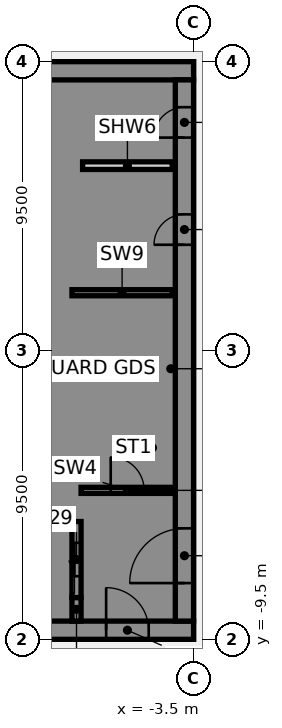
"""IFC4 building model, lengths in metres.
Left out: names, types, materials, properties, quantities, classifications, styles, units other than length and angle.
Written with IfcOpenShell. Run it as: python <this file> out.ifc"""

import sys

from ifc_helpers import new_model, si_unit, direction, frame, frame_2d, origin, place, context, subcontext, project, spatial, polyline, rectangle, outline, extrude, element, fill, save


model = new_model("IFC4")
c1 = context("Model", 3, precision=1e-05, world=origin(), true_north=direction((0.0, 1.0)))
c2 = subcontext(c1, "Body", "Model", "MODEL_VIEW")
j1 = project(units=[si_unit("LENGTHUNIT", "METRE"), si_unit("PLANEANGLEUNIT", "RADIAN")], contexts=[c1])
p1 = place(None, origin())
s1 = spatial("IfcSite", under=j1, at=p1, CompositionType="ELEMENT")
p2 = place(p1, origin())
s2 = spatial("IfcBuilding", under=s1, at=p2, CompositionType="ELEMENT")
p3 = place(p2, frame((0.0, 0.0, 121.0)))
s3 = spatial("IfcBuildingStorey", under=s2, at=p3, CompositionType="ELEMENT", Elevation=121.0)
p4 = place(p3, frame((-16.5, -9.2, 0.0), z_axis=(0.0, 0.0, 1.0), x_axis=(1.0, 0.0, 0.0)))
e1 = element("IfcWall", 1, at=p4, inside=s3, PredefinedType="SHEAR", context=c2, shape_type="SweptSolid", body=[
    extrude(rectangle(XDim=13.0, YDim=0.6, at=frame_2d((6.5, 0.0))), origin(), (0.0, 0.0, 1.0), 3.61),
])
p5 = place(p4, frame((4.15, 0.0, 0.0)))
e2 = element("IfcOpeningElement", 2, at=p5, cuts=e1, PredefinedType="OPENING", context=c2, shape_type="SweptSolid", body=[
    extrude(rectangle(XDim=1.4, YDim=2.1, at=frame_2d((0.7, 1.05))), frame((0.0, 0.31, 0.0), z_axis=(0.0, -1.0, 0.0), x_axis=(1.0, 0.0, 0.0)), (0.0, 0.0, 1.0), 0.62),
])
p6 = place(p4, frame((10.125, 0.0, 0.0)))
e3 = element("IfcOpeningElement", 3, at=p6, cuts=e1, PredefinedType="OPENING", context=c2, shape_type="SweptSolid", body=[
    extrude(rectangle(XDim=1.4, YDim=2.1, at=frame_2d((0.7, 1.05))), frame((0.0, 0.31, 0.0), z_axis=(0.0, -1.0, 0.0), x_axis=(1.0, 0.0, 0.0)), (0.0, 0.0, 1.0), 0.62),
])
p7 = place(p3, frame((-16.5, 9.2, 0.0), z_axis=(0.0, 0.0, 1.0), x_axis=(1.0, 0.0, 0.0)))
e4 = element("IfcWall", 4, at=p7, inside=s3, PredefinedType="SHEAR", context=c2, shape_type="SweptSolid", body=[
    extrude(rectangle(XDim=13.0, YDim=0.6, at=frame_2d((6.5, 0.0))), origin(), (0.0, 0.0, 1.0), 3.61),
])
p8 = place(p3, origin())
e5 = element("IfcWall", 5, at=p8, inside=s3, PredefinedType="SHEAR", context=c2, shape_type="SweptSolid", body=[
    extrude(outline(polyline([(-9.8, -5.375), (-9.8, -5.625), (-7.5, -5.625), (-7.2, -5.625), (-7.2, 8.9), (-7.5, 8.9), (-9.8, 8.9), (-9.8, 8.125), (-7.5, 8.125), (-7.5, 5.625), (-9.8, 5.625), (-9.8, 5.375), (-7.5, 5.375), (-7.5, 2.875), (-9.8, 2.875), (-9.8, 2.625), (-7.5, 2.625), (-7.5, 0.125), (-9.8, 0.125), (-9.8, -0.125), (-7.5, -0.125), (-7.5, -2.625), (-9.8, -2.625), (-9.8, -2.875), (-7.5, -2.875), (-7.5, -5.375), (-9.8, -5.375)])), origin(), (0.0, 0.0, 1.0), 3.61),
])
p9 = place(p3, origin())
e6 = element("IfcWall", 6, at=p9, inside=s3, PredefinedType="SHEAR", context=c2, shape_type="SweptSolid", body=[
    extrude(outline(polyline([(-7.5, -8.125), (-9.55, -8.125), (-9.55, -5.625), (-9.8, -5.625), (-9.8, -8.125), (-9.8, -8.9), (-7.5, -8.9), (-7.5, -8.125)])), origin(), (0.0, 0.0, 1.0), 3.61),
])
p10 = place(p3, frame((-7.35, -8.9, 0.0), z_axis=(0.0, 0.0, 1.0), x_axis=(0.0, 1.0, 0.0)))
e7 = element("IfcWall", 7, at=p10, inside=s3, PredefinedType="SHEAR", context=c2, shape_type="SweptSolid", body=[
    extrude(rectangle(XDim=0.775, YDim=0.3, at=frame_2d((0.387, 0.0))), origin(), (0.0, 0.0, 1.0), 3.61),
])
p11 = place(p3, frame((-7.5, 1.9, 0.0), z_axis=(0.0, 0.0, 1.0), x_axis=(1.0, 0.0, 0.0)))
e8 = element("IfcWall", 8, at=p11, inside=s3, PredefinedType="SHEAR", context=c2, shape_type="SweptSolid", body=[
    extrude(rectangle(XDim=3.3, YDim=0.2, at=frame_2d((1.65, 0.0))), origin(), (0.0, 0.0, 1.0), 3.61),
])
p12 = place(p3, frame((-7.35, -8.125, 0.0), z_axis=(0.0, 0.0, 1.0), x_axis=(0.0, 1.0, 0.0)))
e9 = element("IfcWall", 9, at=p12, inside=s3, PredefinedType="SHEAR", context=c2, shape_type="SweptSolid", body=[
    extrude(rectangle(XDim=2.5, YDim=0.3, at=frame_2d((1.25, 0.0))), origin(), (0.0, 0.0, 1.0), 3.61),
])
p13 = place(p12, frame((0.7, 0.0, 0.0)))
e10 = element("IfcOpeningElement", 10, at=p13, cuts=e9, PredefinedType="OPENING", context=c2, shape_type="SweptSolid", body=[
    extrude(rectangle(XDim=1.1, YDim=2.1, at=frame_2d((0.55, 1.05))), frame((0.0, 0.16, 0.0), z_axis=(0.0, -1.0, 0.0), x_axis=(1.0, 0.0, 0.0)), (0.0, 0.0, 1.0), 0.32),
])
p14 = place(p3, frame((-3.8, -8.9, 0.0), z_axis=(0.0, 0.0, 1.0), x_axis=(0.0, 1.0, 0.0)))
e11 = element("IfcWall", 11, at=p14, inside=s3, PredefinedType="SHEAR", context=c2, shape_type="SweptSolid", body=[
    extrude(rectangle(XDim=17.8, YDim=0.6, at=frame_2d((8.9, 0.0))), origin(), (0.0, 0.0, 1.0), 3.61),
])
p15 = place(p14, frame((1.25, 0.0, 0.0)))
e12 = element("IfcOpeningElement", 12, at=p15, cuts=e11, PredefinedType="OPENING", context=c2, shape_type="SweptSolid", body=[
    extrude(rectangle(XDim=1.8, YDim=2.1, at=frame_2d((0.9, 1.05))), frame((0.0, 0.31, 0.0), z_axis=(0.0, -1.0, 0.0), x_axis=(1.0, 0.0, 0.0)), (0.0, 0.0, 1.0), 0.62),
])
p16 = place(p14, frame((12.377, 0.0, 0.0)))
e13 = element("IfcOpeningElement", 13, at=p16, cuts=e11, PredefinedType="OPENING", context=c2, shape_type="SweptSolid", body=[
    extrude(rectangle(XDim=1.0, YDim=2.1, at=frame_2d((0.5, 1.05))), frame((0.0, 0.31, 0.0), z_axis=(0.0, -1.0, 0.0), x_axis=(1.0, 0.0, 0.0)), (0.0, 0.0, 1.0), 0.62),
])
p17 = place(p14, frame((15.903, 0.0, 0.0)))
e14 = element("IfcOpeningElement", 14, at=p17, cuts=e11, PredefinedType="OPENING", context=c2, shape_type="SweptSolid", body=[
    extrude(rectangle(XDim=1.0, YDim=2.1, at=frame_2d((0.5, 1.05))), frame((0.0, 0.31, 0.0), z_axis=(0.0, -1.0, 0.0), x_axis=(1.0, 0.0, 0.0)), (0.0, 0.0, 1.0), 0.62),
])
p18 = place(p3, frame((-7.15, 6.08, 0.0), z_axis=(0.0, 0.0, 1.0), x_axis=(1.0, 0.0, 0.0)))
e15 = element("IfcWall", 15, at=p18, inside=s3, PredefinedType="PARTITIONING", context=c2, shape_type="SweptSolid", body=[
    extrude(rectangle(XDim=2.95, YDim=0.25, at=frame_2d((1.475, 0.0))), origin(), (0.0, 0.0, 1.0), 3.61),
])
p19 = place(p3, frame((-7.2, -4.6, 0.0), z_axis=(0.0, 0.0, 1.0), x_axis=(1.0, 0.0, 0.0)))
e16 = element("IfcWall", 16, at=p19, inside=s3, PredefinedType="SHEAR", context=c2, shape_type="SweptSolid", body=[
    extrude(rectangle(XDim=3.1, YDim=0.2, at=frame_2d((1.55, 0.0))), origin(), (0.0, 0.0, 1.0), 3.61),
])
p20 = place(p19, frame((0.975, 0.0, 0.0)))
e17 = element("IfcOpeningElement", 17, at=p20, cuts=e16, PredefinedType="OPENING", context=c2, shape_type="SweptSolid", body=[
    extrude(rectangle(XDim=1.1, YDim=2.1, at=frame_2d((0.55, 1.05))), frame((0.0, 0.11, 0.0), z_axis=(0.0, -1.0, 0.0), x_axis=(1.0, 0.0, 0.0)), (0.0, 0.0, 1.0), 0.22),
])
p21 = place(p6, origin())
e18 = element("IfcDoor", 18, at=p21, inside=s3, OperationType="SINGLE_SWING_LEFT", PredefinedType="DOOR", context=c2, shape_type="SweptSolid", body=[
    extrude(rectangle(XDim=1.4, YDim=2.1, at=frame_2d((0.7, 1.05))), frame((0.0, 0.025, 0.0), z_axis=(0.0, -1.0, 0.0), x_axis=(1.0, 0.0, 0.0)), (0.0, 0.0, 1.0), 0.05),
])
fill(e3, e18)
p22 = place(p15, origin())
e19 = element("IfcDoor", 19, at=p22, inside=s3, OperationType="SINGLE_SWING_LEFT", PredefinedType="DOOR", context=c2, shape_type="SweptSolid", body=[
    extrude(rectangle(XDim=1.8, YDim=2.1, at=frame_2d((0.9, 1.05))), frame((0.0, 0.025, 0.0), z_axis=(0.0, -1.0, 0.0), x_axis=(1.0, 0.0, 0.0)), (0.0, 0.0, 1.0), 0.05),
])
fill(e12, e19)
p23 = place(p16, origin())
e20 = element("IfcDoor", 20, at=p23, inside=s3, OperationType="SINGLE_SWING_LEFT", PredefinedType="DOOR", context=c2, shape_type="SweptSolid", body=[
    extrude(rectangle(XDim=1.0, YDim=2.1, at=frame_2d((0.5, 1.05))), frame((0.0, 0.275, 0.0), z_axis=(0.0, -1.0, 0.0), x_axis=(1.0, 0.0, 0.0)), (0.0, 0.0, 1.0), 0.05),
])
fill(e13, e20)
p24 = place(p17, origin())
e21 = element("IfcDoor", 21, at=p24, inside=s3, OperationType="SINGLE_SWING_LEFT", PredefinedType="DOOR", context=c2, shape_type="SweptSolid", body=[
    extrude(rectangle(XDim=1.0, YDim=2.1, at=frame_2d((0.5, 1.05))), frame((0.0, 0.275, 0.0), z_axis=(0.0, -1.0, 0.0), x_axis=(1.0, 0.0, 0.0)), (0.0, 0.0, 1.0), 0.05),
])
fill(e14, e21)
p25 = place(p20, origin())
e22 = element("IfcDoor", 22, at=p25, inside=s3, OperationType="SINGLE_SWING_LEFT", PredefinedType="DOOR", context=c2, shape_type="SweptSolid", body=[
    extrude(rectangle(XDim=1.1, YDim=2.1, at=frame_2d((0.55, 1.05))), frame((0.0, 0.025, 0.0), z_axis=(0.0, -1.0, 0.0), x_axis=(1.0, 0.0, 0.0)), (0.0, 0.0, 1.0), 0.05),
])
fill(e17, e22)
p26 = place(p13, origin())
e23 = element("IfcDoor", 23, at=p26, inside=s3, OperationType="SLIDING_TO_LEFT", PredefinedType="DOOR", context=c2, shape_type="SweptSolid", body=[
    extrude(rectangle(XDim=1.1, YDim=2.1, at=frame_2d((0.55, 1.05))), frame((0.0, 0.025, 0.0), z_axis=(0.0, -1.0, 0.0), x_axis=(1.0, 0.0, 0.0)), (0.0, 0.0, 1.0), 0.05),
])
fill(e10, e23)
save(model, sys.argv[1])
